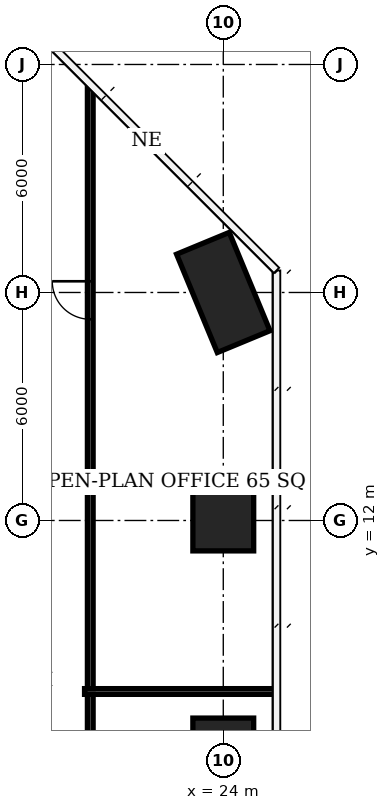
"""IFC4 building model, lengths in metres.
Left out: names, types, materials, properties, quantities, classifications, styles, units other than length and angle.
Written with IfcOpenShell. Run it as: python <this file> out.ifc"""

import sys

from ifc_helpers import new_model, si_unit, direction, frame, frame_2d, origin, origin_2d, place, context, subcontext, project, spatial, rectangle, extrude, element, fill, save


model = new_model("IFC4")
c1 = context("Model", 3, precision=1e-05, world=origin(), true_north=direction((0.0, 1.0)))
c2 = subcontext(c1, "Body", "Model", "MODEL_VIEW")
j1 = project(units=[si_unit("LENGTHUNIT", "METRE"), si_unit("PLANEANGLEUNIT", "RADIAN")], contexts=[c1])
p1 = place(None, origin())
s1 = spatial("IfcSite", under=j1, at=p1, CompositionType="ELEMENT")
p2 = place(p1, origin())
s2 = spatial("IfcBuilding", under=s1, at=p2, CompositionType="ELEMENT")
p3 = place(p2, frame((0.0, 0.0, 231.8)))
s3 = spatial("IfcBuildingStorey", under=s2, at=p3, CompositionType="ELEMENT", Elevation=231.8)
for number, where, z_axis, x_axis in (
    (1, (24.0, 6.0, 0.0), (0.0, 0.0, 1.0), (1.0, 0.0, 0.0)),
    (2, (24.0, 12.0, 0.0), (0.0, 0.0, 1.0), (1.0, 0.0, 0.0)),
):
    element("IfcColumn", number, at=place(p3, frame(where, z_axis=z_axis, x_axis=x_axis)), inside=s3, PredefinedType="COLUMN", context=c2, shape_type="SweptSolid", body=[
        extrude(rectangle(XDim=1.6, YDim=1.6, at=origin_2d()), origin(), (0.0, 0.0, 1.0), 3.9),
    ])
p4 = place(p3, frame((24.0, 18.0, 0.0), z_axis=(0.0, 0.0, 1.0), x_axis=(0.382683432365, -0.923879532511, 0.0)))
e3 = element("IfcColumn", 3, at=p4, inside=s3, PredefinedType="COLUMN", context=c2, shape_type="SweptSolid", body=[
    extrude(rectangle(XDim=2.8, YDim=1.5, at=origin_2d()), origin(), (0.0, 0.0, 1.0), 3.9),
])
p5 = place(p3, frame((20.5, -11.29, 0.0), z_axis=(0.0, 0.0, 1.0), x_axis=(0.0, 1.0, 0.0)))
e4 = element("IfcWall", 4, at=p5, inside=s3, PredefinedType="PARTITIONING", context=c2, shape_type="SweptSolid", body=[
    extrude(rectangle(XDim=18.715, YDim=0.15, at=frame_2d((9.357, 0.0))), origin(), (0.0, 0.0, 1.0), 3.65),
])
p6 = place(p5, frame((9.597, 0.0, 0.0)))
e5 = element("IfcOpeningElement", 5, at=p6, cuts=e4, PredefinedType="OPENING", context=c2, shape_type="SweptSolid", body=[
    extrude(rectangle(XDim=1.0, YDim=2.1, at=frame_2d((0.5, 1.05))), frame((0.0, 0.085, 0.0), z_axis=(0.0, -1.0, 0.0), x_axis=(1.0, 0.0, 0.0)), (0.0, 0.0, 1.0), 0.17),
])
p7 = place(p3, frame((20.5, 7.575, 0.0), z_axis=(0.0, 0.0, 1.0), x_axis=(0.0, 1.0, 0.0)))
e6 = element("IfcWall", 6, at=p7, inside=s3, PredefinedType="PARTITIONING", context=c2, shape_type="SweptSolid", body=[
    extrude(rectangle(XDim=15.813, YDim=0.15, at=frame_2d((7.906, 0.0))), origin(), (0.0, 0.0, 1.0), 3.65),
])
p8 = place(p7, frame((9.72, 0.0, 0.0)))
e7 = element("IfcOpeningElement", 7, at=p8, cuts=e6, PredefinedType="OPENING", context=c2, shape_type="SweptSolid", body=[
    extrude(rectangle(XDim=1.0, YDim=2.1, at=frame_2d((0.5, 1.05))), frame((0.0, 0.085, 0.0), z_axis=(0.0, -1.0, 0.0), x_axis=(1.0, 0.0, 0.0)), (0.0, 0.0, 1.0), 0.17),
])
p9 = place(p3, frame((20.35, 7.5, 0.0), z_axis=(0.0, 0.0, 1.0), x_axis=(1.0, 0.0, 0.0)))
e8 = element("IfcWall", 8, at=p9, inside=s3, PredefinedType="PARTITIONING", context=c2, shape_type="SweptSolid", body=[
    extrude(rectangle(XDim=5.05, YDim=0.15, at=frame_2d((2.525, 0.0))), origin(), (0.0, 0.0, 1.0), 3.65),
])
p10 = place(p8, origin())
e9 = element("IfcDoor", 9, at=p10, inside=s3, OperationType="SINGLE_SWING_RIGHT", PredefinedType="DOOR", context=c2, shape_type="SweptSolid", body=[
    extrude(rectangle(XDim=1.0, YDim=2.1, at=frame_2d((0.5, 1.05))), frame((0.0, 0.025, 0.0), z_axis=(0.0, -1.0, 0.0), x_axis=(1.0, 0.0, 0.0)), (0.0, 0.0, 1.0), 0.05),
])
fill(e7, e9)
save(model, sys.argv[1])
